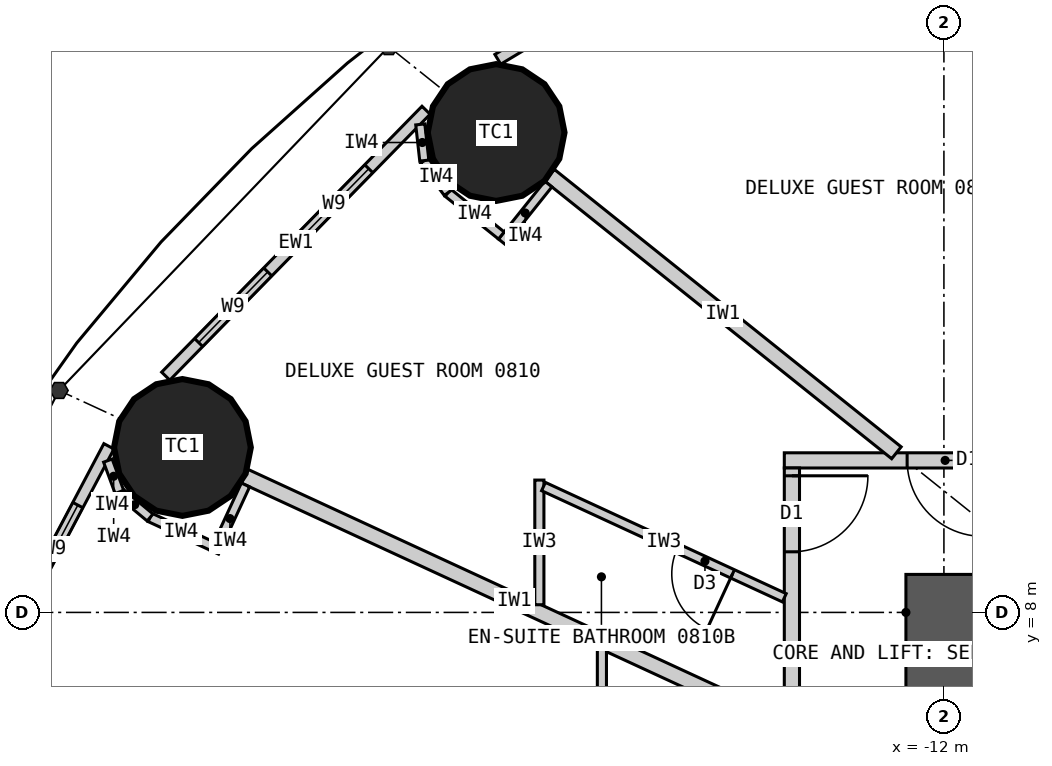
"""IFC4 building model, lengths in metres.
Left out: names, types, materials, properties, quantities, classifications, styles, units other than length and angle.
Written with IfcOpenShell. Run it as: python <this file> out.ifc"""

import sys

from ifc_helpers import new_model, si_unit, direction, frame, frame_2d, origin, origin_2d, place, context, subcontext, project, spatial, rectangle, circle, extrude, element, fill, save


model = new_model("IFC4")
c1 = context("Model", 3, precision=1e-05, world=origin(), true_north=direction((0.0, 1.0)))
c2 = subcontext(c1, "Body", "Model", "MODEL_VIEW")
j1 = project(units=[si_unit("LENGTHUNIT", "METRE"), si_unit("PLANEANGLEUNIT", "RADIAN")], contexts=[c1])
p1 = place(None, origin())
s1 = spatial("IfcSite", under=j1, at=p1, CompositionType="ELEMENT")
p2 = place(p1, origin())
s2 = spatial("IfcBuilding", under=s1, at=p2, CompositionType="ELEMENT")
p3 = place(p2, frame((0.0, 0.0, 39.3)))
s3 = spatial("IfcBuildingStorey", under=s2, at=p3, CompositionType="ELEMENT", Elevation=39.3)
for number, where, z_axis, x_axis in (
    (1, (-17.892, 14.313, 0.0), (0.0, 0.0, 1.0), (1.0, 0.0, 0.0)),
    (2, (-22.019, 10.17, 0.0), (0.0, 0.0, 1.0), (1.0, 0.0, 0.0)),
):
    element("IfcColumn", number, at=place(p3, frame(where, z_axis=z_axis, x_axis=x_axis)), inside=s3, PredefinedType="COLUMN", context=c2, shape_type="SweptSolid", body=[
        extrude(circle(Radius=0.9, at=origin_2d()), origin(), (0.0, 0.0, 1.0), 3.3),
    ])
p4 = place(p3, frame((-12.5, 8.0, 0.0), z_axis=(0.0, 0.0, 1.0), x_axis=(1.0, 0.0, 0.0)))
e3 = element("IfcWall", 3, at=p4, inside=s3, PredefinedType="SHEAR", context=c2, shape_type="SweptSolid", body=[
    extrude(rectangle(XDim=25.0, YDim=1.0, at=frame_2d((12.5, 0.0))), origin(), (0.0, 0.0, 1.0), 3.3),
])
p5 = place(p4, frame((11.2, 0.0, 0.0)))
e4 = element("IfcOpeningElement", 4, at=p5, cuts=e3, PredefinedType="OPENING", context=c2, shape_type="SweptSolid", body=[
    extrude(rectangle(XDim=1.2, YDim=2.2, at=frame_2d((0.6, 1.1))), frame((0.0, 0.51, 0.0), z_axis=(0.0, -1.0, 0.0), x_axis=(1.0, 0.0, 0.0)), (0.0, 0.0, 1.0), 1.02),
])
p6 = place(p4, frame((18.8, 0.0, 0.0)))
e5 = element("IfcOpeningElement", 5, at=p6, cuts=e3, PredefinedType="OPENING", context=c2, shape_type="SweptSolid", body=[
    extrude(rectangle(XDim=0.9, YDim=2.2, at=frame_2d((0.45, 1.1))), frame((0.0, 0.51, 0.0), z_axis=(0.0, -1.0, 0.0), x_axis=(1.0, 0.0, 0.0)), (0.0, 0.0, 1.0), 1.02),
])
p7 = place(p3, frame((-12.0, 7.5, 0.0), z_axis=(0.0, 0.0, 1.0), x_axis=(0.0, -1.0, 0.0)))
e6 = element("IfcWall", 6, at=p7, inside=s3, PredefinedType="SHEAR", context=c2, shape_type="SweptSolid", body=[
    extrude(rectangle(XDim=15.0, YDim=1.0, at=frame_2d((7.5, 0.0))), origin(), (0.0, 0.0, 1.0), 3.3),
])
p8 = place(p7, frame((6.6, 0.0, 0.0)))
e7 = element("IfcOpeningElement", 7, at=p8, cuts=e6, PredefinedType="OPENING", context=c2, shape_type="SweptSolid", body=[
    extrude(rectangle(XDim=1.8, YDim=2.2, at=frame_2d((0.9, 1.1))), frame((0.0, 0.51, 0.0), z_axis=(0.0, -1.0, 0.0), x_axis=(1.0, 0.0, 0.0)), (0.0, 0.0, 1.0), 1.02),
])
p9 = place(p3, frame((-13.412, 17.957, 0.0), z_axis=(0.0, 0.0, 1.0), x_axis=(-0.856958191554, -0.515385931054, 0.0)))
e8 = element("IfcWall", 8, at=p9, inside=s3, PredefinedType="ELEMENTEDWALL", context=c2, shape_type="SweptSolid", body=[
    extrude(rectangle(XDim=5.201, YDim=0.15, at=frame_2d((2.601, 0.0))), origin(), (0.0, 0.0, 1.0), 3.12),
])
p10 = place(p9, frame((1.225, 0.0, 0.9)))
e9 = element("IfcOpeningElement", 9, at=p10, cuts=e8, PredefinedType="OPENING", context=c2, shape_type="SweptSolid", body=[
    extrude(rectangle(XDim=1.3, YDim=1.9, at=frame_2d((0.65, 0.95))), frame((0.0, 0.085, 0.0), z_axis=(0.0, -1.0, 0.0), x_axis=(1.0, 0.0, 0.0)), (0.0, 0.0, 1.0), 0.17),
])
p11 = place(p9, frame((3.125, 0.0, 0.9)))
e10 = element("IfcOpeningElement", 10, at=p11, cuts=e8, PredefinedType="OPENING", context=c2, shape_type="SweptSolid", body=[
    extrude(rectangle(XDim=1.3, YDim=1.9, at=frame_2d((0.65, 0.95))), frame((0.0, 0.085, 0.0), z_axis=(0.0, -1.0, 0.0), x_axis=(1.0, 0.0, 0.0)), (0.0, 0.0, 1.0), 0.17),
])
p12 = place(p3, frame((-18.813, 14.607, 0.0), z_axis=(0.0, 0.0, 1.0), x_axis=(-0.699612594083, -0.714522370679, 0.0)))
e11 = element("IfcWall", 11, at=p12, inside=s3, PredefinedType="ELEMENTEDWALL", context=c2, shape_type="SweptSolid", body=[
    extrude(rectangle(XDim=4.896, YDim=0.15, at=frame_2d((2.448, 0.0))), origin(), (0.0, 0.0, 1.0), 3.12),
])
p13 = place(p12, frame((1.077, 0.0, 0.9)))
e12 = element("IfcOpeningElement", 12, at=p13, cuts=e11, PredefinedType="OPENING", context=c2, shape_type="SweptSolid", body=[
    extrude(rectangle(XDim=1.3, YDim=1.9, at=frame_2d((0.65, 0.95))), frame((0.0, 0.085, 0.0), z_axis=(0.0, -1.0, 0.0), x_axis=(1.0, 0.0, 0.0)), (0.0, 0.0, 1.0), 0.17),
])
p14 = place(p12, frame((2.977, 0.0, 0.9)))
e13 = element("IfcOpeningElement", 13, at=p14, cuts=e11, PredefinedType="OPENING", context=c2, shape_type="SweptSolid", body=[
    extrude(rectangle(XDim=1.3, YDim=1.9, at=frame_2d((0.65, 0.95))), frame((0.0, 0.085, 0.0), z_axis=(0.0, -1.0, 0.0), x_axis=(1.0, 0.0, 0.0)), (0.0, 0.0, 1.0), 0.17),
])
p15 = place(p3, frame((-22.986, 10.185, 0.0), z_axis=(0.0, 0.0, 1.0), x_axis=(-0.467303182954, -0.884097129959, 0.0)))
e14 = element("IfcWall", 14, at=p15, inside=s3, PredefinedType="ELEMENTEDWALL", context=c2, shape_type="SweptSolid", body=[
    extrude(rectangle(XDim=4.606, YDim=0.15, at=frame_2d((2.303, 0.0))), origin(), (0.0, 0.0, 1.0), 3.12),
])
p16 = place(p15, frame((0.875, 0.0, 0.9)))
e15 = element("IfcOpeningElement", 15, at=p16, cuts=e14, PredefinedType="OPENING", context=c2, shape_type="SweptSolid", body=[
    extrude(rectangle(XDim=1.3, YDim=1.9, at=frame_2d((0.65, 0.95))), frame((0.0, 0.085, 0.0), z_axis=(0.0, -1.0, 0.0), x_axis=(1.0, 0.0, 0.0)), (0.0, 0.0, 1.0), 0.17),
])
p17 = place(p15, frame((2.775, 0.0, 0.9)))
e16 = element("IfcOpeningElement", 16, at=p17, cuts=e14, PredefinedType="OPENING", context=c2, shape_type="SweptSolid", body=[
    extrude(rectangle(XDim=1.3, YDim=1.9, at=frame_2d((0.65, 0.95))), frame((0.0, 0.085, 0.0), z_axis=(0.0, -1.0, 0.0), x_axis=(1.0, 0.0, 0.0)), (0.0, 0.0, 1.0), 0.17),
])
p18 = place(p3, frame((-14.1, 10.0, 0.0), z_axis=(0.0, 0.0, 1.0), x_axis=(1.0, 0.0, 0.0)))
e17 = element("IfcWall", 17, at=p18, inside=s3, PredefinedType="PARTITIONING", context=c2, shape_type="SweptSolid", body=[
    extrude(rectangle(XDim=28.2, YDim=0.2, at=frame_2d((14.1, 0.0))), origin(), (0.0, 0.0, 1.0), 3.12),
])
p19 = place(p18, frame((23.477, 0.0, 0.0)))
e18 = element("IfcOpeningElement", 18, at=p19, cuts=e17, PredefinedType="OPENING", context=c2, shape_type="SweptSolid", body=[
    extrude(rectangle(XDim=1.0, YDim=2.2, at=frame_2d((0.5, 1.1))), frame((0.0, 0.11, 0.0), z_axis=(0.0, -1.0, 0.0), x_axis=(1.0, 0.0, 0.0)), (0.0, 0.0, 1.0), 0.22),
])
p20 = place(p18, frame((18.529, 0.0, 0.0)))
e19 = element("IfcOpeningElement", 19, at=p20, cuts=e17, PredefinedType="OPENING", context=c2, shape_type="SweptSolid", body=[
    extrude(rectangle(XDim=1.0, YDim=2.2, at=frame_2d((0.5, 1.1))), frame((0.0, 0.11, 0.0), z_axis=(0.0, -1.0, 0.0), x_axis=(1.0, 0.0, 0.0)), (0.0, 0.0, 1.0), 0.22),
])
p21 = place(p18, frame((14.623, 0.0, 0.0)))
e20 = element("IfcOpeningElement", 20, at=p21, cuts=e17, PredefinedType="OPENING", context=c2, shape_type="SweptSolid", body=[
    extrude(rectangle(XDim=1.0, YDim=2.2, at=frame_2d((0.5, 1.1))), frame((0.0, 0.11, 0.0), z_axis=(0.0, -1.0, 0.0), x_axis=(1.0, 0.0, 0.0)), (0.0, 0.0, 1.0), 0.22),
])
p22 = place(p18, frame((11.252, 0.0, 0.0)))
e21 = element("IfcOpeningElement", 21, at=p22, cuts=e17, PredefinedType="OPENING", context=c2, shape_type="SweptSolid", body=[
    extrude(rectangle(XDim=1.0, YDim=2.1, at=frame_2d((0.5, 1.05))), frame((0.0, 0.11, 0.0), z_axis=(0.0, -1.0, 0.0), x_axis=(1.0, 0.0, 0.0)), (0.0, 0.0, 1.0), 0.22),
])
p23 = place(p18, frame((8.671, 0.0, 0.0)))
e22 = element("IfcOpeningElement", 22, at=p23, cuts=e17, PredefinedType="OPENING", context=c2, shape_type="SweptSolid", body=[
    extrude(rectangle(XDim=1.0, YDim=2.2, at=frame_2d((0.5, 1.1))), frame((0.0, 0.11, 0.0), z_axis=(0.0, -1.0, 0.0), x_axis=(1.0, 0.0, 0.0)), (0.0, 0.0, 1.0), 0.22),
])
p24 = place(p18, frame((1.616, 0.0, 0.0)))
e23 = element("IfcOpeningElement", 23, at=p24, cuts=e17, PredefinedType="OPENING", context=c2, shape_type="SweptSolid", body=[
    extrude(rectangle(XDim=1.0, YDim=2.2, at=frame_2d((0.5, 1.1))), frame((0.0, 0.11, 0.0), z_axis=(0.0, -1.0, 0.0), x_axis=(1.0, 0.0, 0.0)), (0.0, 0.0, 1.0), 0.22),
])
p25 = place(p3, frame((-14.0, 9.9, 0.0), z_axis=(0.0, 0.0, 1.0), x_axis=(0.0, -1.0, 0.0)))
e24 = element("IfcWall", 24, at=p25, inside=s3, PredefinedType="PARTITIONING", context=c2, shape_type="SweptSolid", body=[
    extrude(rectangle(XDim=19.8, YDim=0.2, at=frame_2d((9.9, 0.0))), origin(), (0.0, 0.0, 1.0), 3.12),
])
p26 = place(p25, frame((0.103, 0.0, 0.0)))
e25 = element("IfcOpeningElement", 25, at=p26, cuts=e24, PredefinedType="OPENING", context=c2, shape_type="SweptSolid", body=[
    extrude(rectangle(XDim=1.0, YDim=2.2, at=frame_2d((0.5, 1.1))), frame((0.0, 0.11, 0.0), z_axis=(0.0, -1.0, 0.0), x_axis=(1.0, 0.0, 0.0)), (0.0, 0.0, 1.0), 0.22),
])
p27 = place(p25, frame((5.252, 0.0, 0.0)))
e26 = element("IfcOpeningElement", 26, at=p27, cuts=e24, PredefinedType="OPENING", context=c2, shape_type="SweptSolid", body=[
    extrude(rectangle(XDim=1.0, YDim=2.0, at=frame_2d((0.5, 1.0))), frame((0.0, 0.11, 0.0), z_axis=(0.0, -1.0, 0.0), x_axis=(1.0, 0.0, 0.0)), (0.0, 0.0, 1.0), 0.22),
])
p28 = place(p25, frame((10.117, 0.0, 0.0)))
e27 = element("IfcOpeningElement", 27, at=p28, cuts=e24, PredefinedType="OPENING", context=c2, shape_type="SweptSolid", body=[
    extrude(rectangle(XDim=1.0, YDim=2.2, at=frame_2d((0.5, 1.1))), frame((0.0, 0.11, 0.0), z_axis=(0.0, -1.0, 0.0), x_axis=(1.0, 0.0, 0.0)), (0.0, 0.0, 1.0), 0.22),
])
p29 = place(p25, frame((13.247, 0.0, 0.0)))
e28 = element("IfcOpeningElement", 28, at=p29, cuts=e24, PredefinedType="OPENING", context=c2, shape_type="SweptSolid", body=[
    extrude(rectangle(XDim=1.0, YDim=2.0, at=frame_2d((0.5, 1.0))), frame((0.0, 0.11, 0.0), z_axis=(0.0, -1.0, 0.0), x_axis=(1.0, 0.0, 0.0)), (0.0, 0.0, 1.0), 0.22),
])
p30 = place(p25, frame((15.679, 0.0, 0.0)))
e29 = element("IfcOpeningElement", 29, at=p30, cuts=e24, PredefinedType="OPENING", context=c2, shape_type="SweptSolid", body=[
    extrude(rectangle(XDim=1.0, YDim=2.2, at=frame_2d((0.5, 1.1))), frame((0.0, 0.11, 0.0), z_axis=(0.0, -1.0, 0.0), x_axis=(1.0, 0.0, 0.0)), (0.0, 0.0, 1.0), 0.22),
])
p31 = place(p3, frame((-7.289, 10.1, 0.0), z_axis=(0.0, 0.0, 1.0), x_axis=(-0.585216319319, 0.810877216108, 0.0)))
e30 = element("IfcWall", 30, at=p31, inside=s3, PredefinedType="PARTITIONING", context=c2, shape_type="SweptSolid", body=[
    extrude(rectangle(XDim=8.16, YDim=0.2, at=frame_2d((4.08, 0.0))), origin(), (0.0, 0.0, 1.0), 2.32),
])
p32 = place(p3, frame((-12.625, 10.1, 0.0), z_axis=(0.0, 0.0, 1.0), x_axis=(-0.780872884676, 0.624689953479, 0.0)))
e31 = element("IfcWall", 31, at=p32, inside=s3, PredefinedType="PARTITIONING", context=c2, shape_type="SweptSolid", body=[
    extrude(rectangle(XDim=5.845, YDim=0.2, at=frame_2d((2.922, 0.0))), origin(), (0.0, 0.0, 1.0), 2.32),
])
p33 = place(p3, frame((-14.1, 6.512, 0.0), z_axis=(0.0, 0.0, 1.0), x_axis=(-0.907842433118, 0.41931147925, 0.0)))
e32 = element("IfcWall", 32, at=p33, inside=s3, PredefinedType="PARTITIONING", context=c2, shape_type="SweptSolid", body=[
    extrude(rectangle(XDim=7.823, YDim=0.2, at=frame_2d((3.912, 0.0))), origin(), (0.0, 0.0, 1.0), 2.32),
])
p34 = place(p3, frame((-17.323, 8.101, 0.0), z_axis=(0.0, 0.0, 1.0), x_axis=(0.0, 1.0, 0.0)))
e33 = element("IfcWall", 33, at=p34, inside=s3, PredefinedType="PARTITIONING", context=c2, shape_type="SweptSolid", body=[
    extrude(rectangle(XDim=1.64, YDim=0.12, at=frame_2d((0.82, 0.0))), origin(), (0.0, 0.0, 1.0), 3.12),
])
p35 = place(p3, frame((-14.1, 8.193, 0.0), z_axis=(0.0, 0.0, 1.0), x_axis=(-0.907836493557, 0.419324338628, 0.0)))
e34 = element("IfcWall", 34, at=p35, inside=s3, PredefinedType="PARTITIONING", context=c2, shape_type="SweptSolid", body=[
    extrude(rectangle(XDim=3.49, YDim=0.12, at=frame_2d((1.745, 0.0))), origin(), (0.0, 0.0, 1.0), 3.12),
])
p36 = place(p35, frame((0.75, 0.0, 0.0)))
e35 = element("IfcOpeningElement", 35, at=p36, cuts=e34, PredefinedType="OPENING", context=c2, shape_type="SweptSolid", body=[
    extrude(rectangle(XDim=0.8, YDim=2.1, at=frame_2d((0.4, 1.05))), frame((0.0, 0.07, 0.0), z_axis=(0.0, -1.0, 0.0), x_axis=(1.0, 0.0, 0.0)), (0.0, 0.0, 1.0), 0.14),
])
p37 = place(p3, frame((-16.5, 7.521, 0.0), z_axis=(0.0, 0.0, 1.0), x_axis=(0.0, -1.0, 0.0)))
e36 = element("IfcWall", 36, at=p37, inside=s3, PredefinedType="PARTITIONING", context=c2, shape_type="SweptSolid", body=[
    extrude(rectangle(XDim=2.749, YDim=0.12, at=frame_2d((1.374, 0.0))), origin(), (0.0, 0.0, 1.0), 3.12),
])
p38 = place(p3, frame((-17.205, 13.635, 0.0), z_axis=(0.0, 0.0, 1.0), x_axis=(-0.624756144097, -0.780819928289, 0.0)))
e37 = element("IfcWall", 37, at=p38, inside=s3, PredefinedType="PARTITIONING", context=c2, shape_type="SweptSolid", body=[
    extrude(rectangle(XDim=0.975, YDim=0.12, at=frame_2d((0.487, 0.0))), origin(), (0.0, 0.0, 1.0), 3.12),
])
p39 = place(p3, frame((-17.823, 12.959, 0.0), z_axis=(0.0, 0.0, 1.0), x_axis=(-0.780895271023, 0.624661969144, 0.0)))
e38 = element("IfcWall", 38, at=p39, inside=s3, PredefinedType="PARTITIONING", context=c2, shape_type="SweptSolid", body=[
    extrude(rectangle(XDim=0.9, YDim=0.12, at=frame_2d((0.45, 0.0))), origin(), (0.0, 0.0, 1.0), 3.12),
])
p40 = place(p3, frame((-18.526, 13.521, 0.0), z_axis=(0.0, 0.0, 1.0), x_axis=(-0.592532503205, 0.805546542818, 0.0)))
e39 = element("IfcWall", 39, at=p40, inside=s3, PredefinedType="PARTITIONING", context=c2, shape_type="SweptSolid", body=[
    extrude(rectangle(XDim=0.525, YDim=0.12, at=frame_2d((0.262, 0.0))), origin(), (0.0, 0.0, 1.0), 3.12),
])
p41 = place(p3, frame((-18.837, 13.944, 0.0), z_axis=(0.0, 0.0, 1.0), x_axis=(-0.110543348478, 0.993871303594, 0.0)))
e40 = element("IfcWall", 40, at=p41, inside=s3, PredefinedType="PARTITIONING", context=c2, shape_type="SweptSolid", body=[
    extrude(rectangle(XDim=0.479, YDim=0.12, at=frame_2d((0.24, 0.0))), origin(), (0.0, 0.0, 1.0), 3.12),
])
p42 = place(p3, frame((-21.189, 9.677, 0.0), z_axis=(0.0, 0.0, 1.0), x_axis=(-0.419344098106, -0.907827366509, 0.0)))
e41 = element("IfcWall", 41, at=p42, inside=s3, PredefinedType="PARTITIONING", context=c2, shape_type="SweptSolid", body=[
    extrude(rectangle(XDim=0.975, YDim=0.12, at=frame_2d((0.487, 0.0))), origin(), (0.0, 0.0, 1.0), 3.12),
])
p43 = place(p3, frame((-21.627, 8.872, 0.0), z_axis=(0.0, 0.0, 1.0), x_axis=(-0.907935564339, 0.419109783957, 0.0)))
e42 = element("IfcWall", 42, at=p43, inside=s3, PredefinedType="PARTITIONING", context=c2, shape_type="SweptSolid", body=[
    extrude(rectangle(XDim=0.9, YDim=0.12, at=frame_2d((0.45, 0.0))), origin(), (0.0, 0.0, 1.0), 3.12),
])
p44 = place(p3, frame((-22.445, 9.249, 0.0), z_axis=(0.0, 0.0, 1.0), x_axis=(-0.768335565584, 0.640047231584, 0.0)))
e43 = element("IfcWall", 43, at=p44, inside=s3, PredefinedType="PARTITIONING", context=c2, shape_type="SweptSolid", body=[
    extrude(rectangle(XDim=0.525, YDim=0.12, at=frame_2d((0.263, 0.0))), origin(), (0.0, 0.0, 1.0), 3.12),
])
p45 = place(p3, frame((-22.848, 9.585, 0.0), z_axis=(0.0, 0.0, 1.0), x_axis=(-0.345267312673, 0.938504386138, 0.0)))
e44 = element("IfcWall", 44, at=p45, inside=s3, PredefinedType="PARTITIONING", context=c2, shape_type="SweptSolid", body=[
    extrude(rectangle(XDim=0.439, YDim=0.12, at=frame_2d((0.22, 0.0))), origin(), (0.0, 0.0, 1.0), 3.12),
])
p46 = place(p13, origin())
e45 = element("IfcWindow", 45, at=p46, inside=s3, PartitioningType="SINGLE_PANEL", PredefinedType="WINDOW", context=c2, shape_type="SweptSolid", body=[
    extrude(rectangle(XDim=1.3, YDim=1.9, at=frame_2d((0.65, 0.95))), frame((0.0, 0.03, 0.0), z_axis=(0.0, -1.0, 0.0), x_axis=(1.0, 0.0, 0.0)), (0.0, 0.0, 1.0), 0.06),
])
fill(e12, e45)
p47 = place(p14, origin())
e46 = element("IfcWindow", 46, at=p47, inside=s3, PartitioningType="SINGLE_PANEL", PredefinedType="WINDOW", context=c2, shape_type="SweptSolid", body=[
    extrude(rectangle(XDim=1.3, YDim=1.9, at=frame_2d((0.65, 0.95))), frame((0.0, 0.03, 0.0), z_axis=(0.0, -1.0, 0.0), x_axis=(1.0, 0.0, 0.0)), (0.0, 0.0, 1.0), 0.06),
])
fill(e13, e46)
p48 = place(p16, origin())
e47 = element("IfcWindow", 47, at=p48, inside=s3, PartitioningType="SINGLE_PANEL", PredefinedType="WINDOW", context=c2, shape_type="SweptSolid", body=[
    extrude(rectangle(XDim=1.3, YDim=1.9, at=frame_2d((0.65, 0.95))), frame((0.0, 0.03, 0.0), z_axis=(0.0, -1.0, 0.0), x_axis=(1.0, 0.0, 0.0)), (0.0, 0.0, 1.0), 0.06),
])
fill(e15, e47)
p49 = place(p24, origin())
e48 = element("IfcDoor", 48, at=p49, inside=s3, OperationType="SINGLE_SWING_RIGHT", PredefinedType="DOOR", context=c2, shape_type="SweptSolid", body=[
    extrude(rectangle(XDim=1.0, YDim=2.2, at=frame_2d((0.5, 1.1))), frame((0.0, 0.025, 0.0), z_axis=(0.0, -1.0, 0.0), x_axis=(1.0, 0.0, 0.0)), (0.0, 0.0, 1.0), 0.05),
])
fill(e23, e48)
p50 = place(p36, origin())
e49 = element("IfcDoor", 49, at=p50, inside=s3, OperationType="SINGLE_SWING_LEFT", PredefinedType="DOOR", context=c2, shape_type="SweptSolid", body=[
    extrude(rectangle(XDim=0.8, YDim=2.1, at=frame_2d((0.4, 1.05))), frame((0.0, 0.025, 0.0), z_axis=(0.0, -1.0, 0.0), x_axis=(1.0, 0.0, 0.0)), (0.0, 0.0, 1.0), 0.05),
])
fill(e35, e49)
p51 = place(p26, origin())
e50 = element("IfcDoor", 50, at=p51, inside=s3, OperationType="SINGLE_SWING_LEFT", PredefinedType="DOOR", context=c2, shape_type="SweptSolid", body=[
    extrude(rectangle(XDim=1.0, YDim=2.2, at=frame_2d((0.5, 1.1))), frame((0.0, 0.025, 0.0), z_axis=(0.0, -1.0, 0.0), x_axis=(1.0, 0.0, 0.0)), (0.0, 0.0, 1.0), 0.05),
])
fill(e25, e50)
save(model, sys.argv[1])
